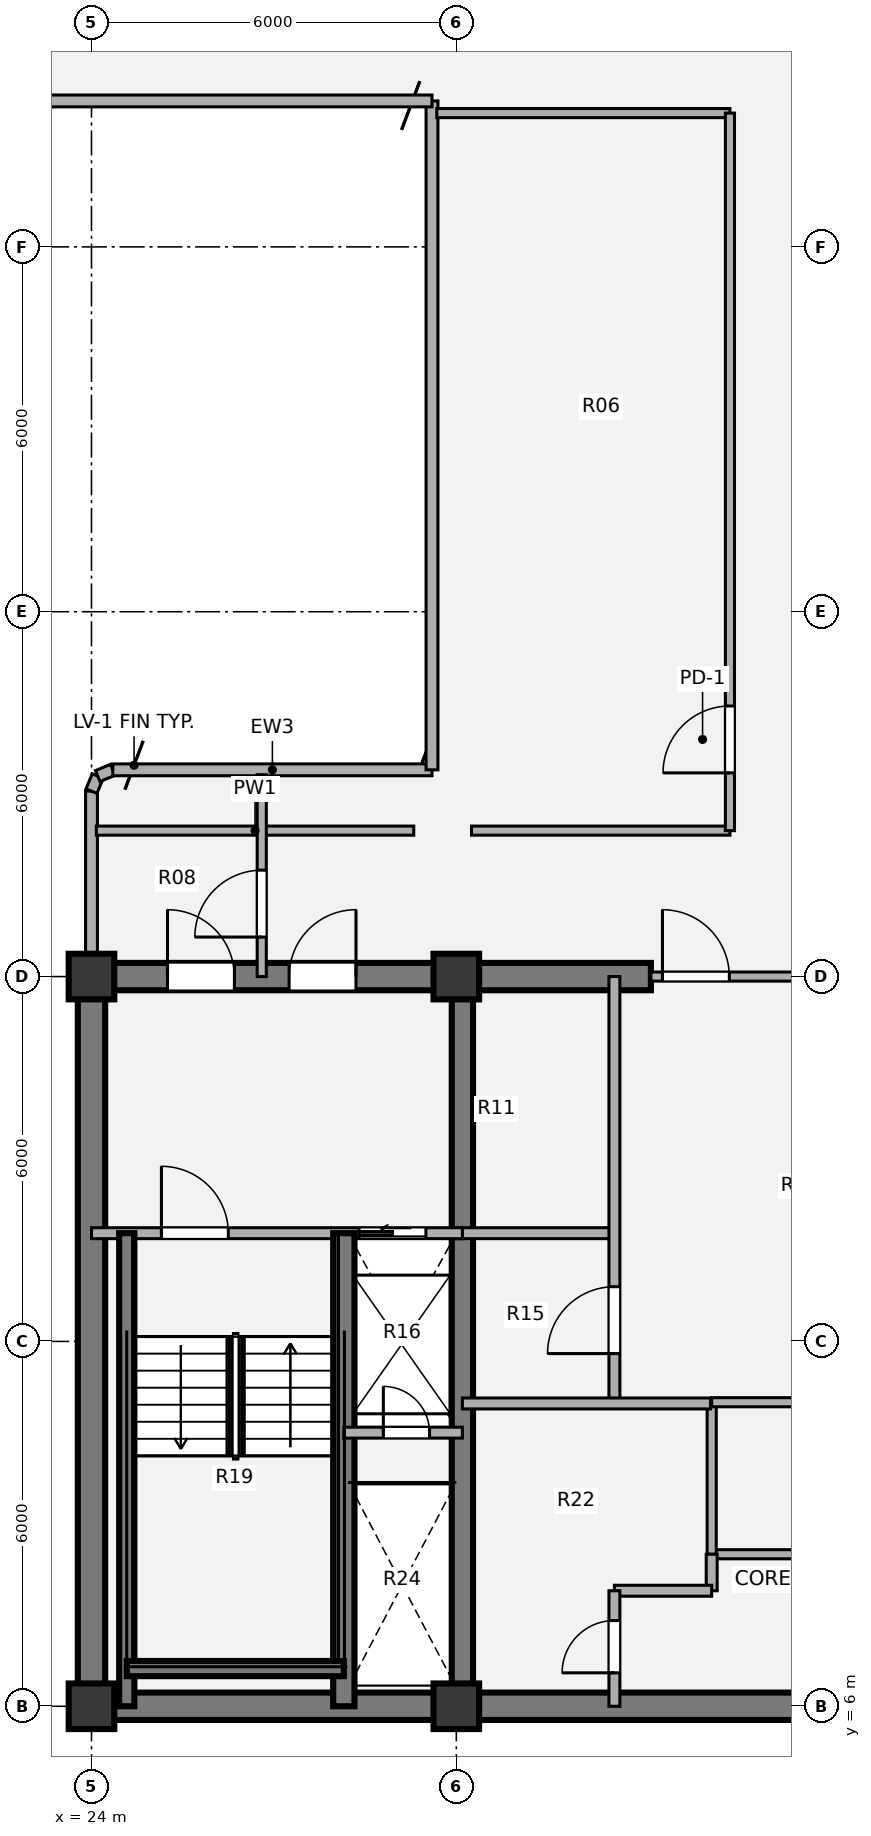
"""IFC4 building model, lengths in metres.
Left out: names, types, materials, properties, quantities, classifications, styles, units other than length and angle.
Written with IfcOpenShell. Run it as: python <this file> out.ifc"""

import sys

from ifc_helpers import new_model, si_unit, direction, frame, frame_2d, origin, origin_2d, place, context, subcontext, project, spatial, rectangle, extrude, source, transform, mapped, element, fill, save


model = new_model("IFC4")
c1 = context("Model", 3, precision=1e-05, world=origin(), true_north=direction((0.0, 1.0)))
c2 = subcontext(c1, "Body", "Model", "MODEL_VIEW")
j1 = project(units=[si_unit("LENGTHUNIT", "METRE"), si_unit("PLANEANGLEUNIT", "RADIAN")], contexts=[c1])
p1 = place(None, origin())
s1 = spatial("IfcSite", under=j1, at=p1, CompositionType="ELEMENT")
p2 = place(p1, origin())
s2 = spatial("IfcBuilding", under=s1, at=p2, CompositionType="ELEMENT")
p3 = place(p2, frame((0.0, 0.0, 213.12)))
s3 = spatial("IfcBuildingStorey", under=s2, at=p3, CompositionType="ELEMENT", Elevation=213.12)
m1 = source(origin(), c2, "Body", "SweptSolid", [
    extrude(rectangle(XDim=0.75, YDim=0.75, at=origin_2d()), origin(), (0.0, 0.0, 1.0), 5.4),
])
for number, where, z_axis, x_axis in (
    (1, (24.0, 6.0, 0.0), (0.0, 0.0, 1.0), (1.0, 0.0, 0.0)),
    (2, (30.0, 6.0, 0.0), (0.0, 0.0, 1.0), (1.0, 0.0, 0.0)),
    (3, (24.0, 18.0, 0.0), (0.0, 0.0, 1.0), (1.0, 0.0, 0.0)),
    (4, (30.0, 18.0, 0.0), (0.0, 0.0, 1.0), (1.0, 0.0, 0.0)),
):
    element("IfcColumn", number, at=place(p3, frame(where, z_axis=z_axis, x_axis=x_axis)), inside=s3, PredefinedType="COLUMN", context=c2, shape_type="MappedRepresentation", body=[
        mapped(m1, transform((0.0, 0.0, 0.0), x_axis=(1.0, 0.0, 0.0), y_axis=(0.0, 1.0, 0.0), z_axis=(0.0, 0.0, 1.0), scale=1.0)),
    ])
p4 = place(p3, frame((48.225, 6.0, 0.0), z_axis=(0.0, 0.0, 1.0), x_axis=(-1.0, 0.0, 0.0)))
e5 = element("IfcWall", 5, at=p4, inside=s3, PredefinedType="SHEAR", context=c2, shape_type="SweptSolid", body=[
    extrude(rectangle(XDim=24.45, YDim=0.45, at=frame_2d((12.225, 0.0))), origin(), (0.0, 0.0, 1.0), 5.4),
])
p5 = place(p3, frame((24.0, 6.0, 0.0), z_axis=(0.0, 0.0, 1.0), x_axis=(0.0, 1.0, 0.0)))
e6 = element("IfcWall", 6, at=p5, inside=s3, PredefinedType="SHEAR", context=c2, shape_type="SweptSolid", body=[
    extrude(rectangle(XDim=12.0, YDim=0.45, at=frame_2d((6.0, 0.0))), origin(), (0.0, 0.0, 1.0), 5.4),
])
p6 = place(p3, frame((23.775, 18.0, 0.0), z_axis=(0.0, 0.0, 1.0), x_axis=(1.0, 0.0, 0.0)))
e7 = element("IfcWall", 7, at=p6, inside=s3, PredefinedType="SHEAR", context=c2, shape_type="SweptSolid", body=[
    extrude(rectangle(XDim=9.425, YDim=0.45, at=frame_2d((4.712, 0.0))), origin(), (0.0, 0.0, 1.0), 5.4),
])
p7 = place(p6, frame((1.475, 0.0, 0.0)))
e8 = element("IfcOpeningElement", 8, at=p7, cuts=e7, PredefinedType="OPENING", context=c2, shape_type="SweptSolid", body=[
    extrude(rectangle(XDim=1.1, YDim=2.1, at=origin_2d()), frame((0.55, 0.235, 1.05), z_axis=(0.0, -1.0, 0.0), x_axis=(1.0, 0.0, 0.0)), (0.0, 0.0, 1.0), 0.47),
])
p8 = place(p6, frame((3.475, 0.0, 0.0)))
e9 = element("IfcOpeningElement", 9, at=p8, cuts=e7, PredefinedType="OPENING", context=c2, shape_type="SweptSolid", body=[
    extrude(rectangle(XDim=1.1, YDim=2.1, at=origin_2d()), frame((0.55, 0.235, 1.05), z_axis=(0.0, -1.0, 0.0), x_axis=(1.0, 0.0, 0.0)), (0.0, 0.0, 1.0), 0.47),
])
p9 = place(p3, frame((30.1, 6.0, 0.0), z_axis=(0.0, 0.0, 1.0), x_axis=(0.0, 1.0, 0.0)))
e10 = element("IfcWall", 10, at=p9, inside=s3, PredefinedType="SHEAR", context=c2, shape_type="SweptSolid", body=[
    extrude(rectangle(XDim=12.0, YDim=0.35, at=frame_2d((6.0, 0.0))), origin(), (0.0, 0.0, 1.0), 5.4),
])
p10 = place(p3, frame((24.0, 18.355, 0.0), z_axis=(0.0, 0.0, 1.0), x_axis=(0.0, 1.0, 0.0)))
e11 = element("IfcWall", 11, at=p10, inside=s3, PredefinedType="SOLIDWALL", context=c2, shape_type="SweptSolid", body=[
    extrude(rectangle(XDim=2.695, YDim=0.195, at=frame_2d((1.348, 0.0))), origin(), (0.0, 0.0, 1.0), 3.268),
])
p11 = place(p3, frame((24.0, 21.05, 0.0), z_axis=(0.0, 0.0, 1.0), x_axis=(0.382673670509, 0.923883575944, 0.0)))
e12 = element("IfcWall", 12, at=p11, inside=s3, PredefinedType="SOLIDWALL", context=c2, shape_type="SweptSolid", body=[
    extrude(rectangle(XDim=0.268, YDim=0.195, at=frame_2d((0.134, 0.0))), origin(), (0.0, 0.0, 1.0), 5.08),
])
p12 = place(p3, frame((24.103, 21.298, 0.0), z_axis=(0.0, 0.0, 1.0), x_axis=(0.924205486139, 0.381895560841, 0.0)))
e13 = element("IfcWall", 13, at=p12, inside=s3, PredefinedType="SOLIDWALL", context=c2, shape_type="SweptSolid", body=[
    extrude(rectangle(XDim=0.268, YDim=0.195, at=frame_2d((0.134, 0.0))), origin(), (0.0, 0.0, 1.0), 5.08),
])
p13 = place(p3, frame((24.35, 21.4, 0.0), z_axis=(0.0, 0.0, 1.0), x_axis=(1.0, 0.0, 0.0)))
e14 = element("IfcWall", 14, at=p13, inside=s3, PredefinedType="SOLIDWALL", context=c2, shape_type="SweptSolid", body=[
    extrude(rectangle(XDim=5.25, YDim=0.195, at=frame_2d((2.625, 0.0))), origin(), (0.0, 0.0, 1.0), 5.08),
])
p14 = place(p3, frame((29.6, 21.4, 0.0), z_axis=(0.0, 0.0, 1.0), x_axis=(0.0, 1.0, 0.0)))
e15 = element("IfcWall", 15, at=p14, inside=s3, PredefinedType="SOLIDWALL", context=c2, shape_type="SweptSolid", body=[
    extrude(rectangle(XDim=11.0, YDim=0.195, at=frame_2d((5.5, 0.0))), origin(), (0.0, 0.0, 1.0), 5.08),
])
p15 = place(p3, frame((29.6, 32.4, 0.0), z_axis=(0.0, 0.0, 1.0), x_axis=(-1.0, 0.0, 0.0)))
e16 = element("IfcWall", 16, at=p15, inside=s3, PredefinedType="SOLIDWALL", context=c2, shape_type="SweptSolid", body=[
    extrude(rectangle(XDim=10.6, YDim=0.195, at=frame_2d((5.3, 0.0))), origin(), (0.0, 0.0, 1.0), 5.08),
])
p16 = place(p3, frame((30.0, 13.78, 0.0), z_axis=(0.0, 0.0, 1.0), x_axis=(1.0, 0.0, 0.0)))
e17 = element("IfcWall", 17, at=p16, inside=s3, PredefinedType="PARTITIONING", context=c2, shape_type="SweptSolid", body=[
    extrude(rectangle(XDim=2.6, YDim=0.18, at=frame_2d((1.3, 0.0))), origin(), (0.0, 0.0, 1.0), 5.05),
])
p17 = place(p3, frame((32.6, 11.0, 0.0), z_axis=(0.0, 0.0, 1.0), x_axis=(0.0, 1.0, 0.0)))
e18 = element("IfcWall", 18, at=p17, inside=s3, PredefinedType="PARTITIONING", context=c2, shape_type="SweptSolid", body=[
    extrude(rectangle(XDim=7.0, YDim=0.18, at=frame_2d((3.5, 0.0))), origin(), (0.0, 0.0, 1.0), 5.05),
])
p18 = place(p17, frame((0.8, 0.0, 0.0)))
e19 = element("IfcOpeningElement", 19, at=p18, cuts=e18, PredefinedType="OPENING", context=c2, shape_type="SweptSolid", body=[
    extrude(rectangle(XDim=1.1, YDim=2.1, at=origin_2d()), frame((0.55, 0.1, 1.05), z_axis=(0.0, -1.0, 0.0), x_axis=(1.0, 0.0, 0.0)), (0.0, 0.0, 1.0), 0.2),
])
p19 = place(p3, frame((34.2, 8.5, 0.0), z_axis=(0.0, 0.0, 1.0), x_axis=(1.0, 0.0, 0.0)))
e20 = element("IfcWall", 20, at=p19, inside=s3, PredefinedType="PARTITIONING", context=c2, shape_type="SweptSolid", body=[
    extrude(rectangle(XDim=5.15, YDim=0.15, at=frame_2d((2.575, 0.0))), origin(), (0.0, 0.0, 1.0), 5.05),
])
p20 = place(p3, frame((34.2, 8.5, 0.0), z_axis=(0.0, 0.0, 1.0), x_axis=(0.0, 1.0, 0.0)))
e21 = element("IfcWall", 21, at=p20, inside=s3, PredefinedType="PARTITIONING", context=c2, shape_type="SweptSolid", body=[
    extrude(rectangle(XDim=2.5, YDim=0.15, at=frame_2d((1.25, 0.0))), origin(), (0.0, 0.0, 1.0), 5.05),
])
p21 = place(p3, frame((34.2, 11.0, 0.0), z_axis=(0.0, 0.0, 1.0), x_axis=(1.0, 0.0, 0.0)))
e22 = element("IfcWall", 22, at=p21, inside=s3, PredefinedType="PARTITIONING", context=c2, shape_type="SweptSolid", body=[
    extrude(rectangle(XDim=5.15, YDim=0.15, at=frame_2d((2.575, 0.0))), origin(), (0.0, 0.0, 1.0), 5.05),
])
p22 = place(p21, frame((2.0, 0.0, 0.0)))
e23 = element("IfcOpeningElement", 23, at=p22, cuts=e22, PredefinedType="OPENING", context=c2, shape_type="SweptSolid", body=[
    extrude(rectangle(XDim=1.1, YDim=2.1, at=origin_2d()), frame((0.55, 0.085, 1.05), z_axis=(0.0, -1.0, 0.0), x_axis=(1.0, 0.0, 0.0)), (0.0, 0.0, 1.0), 0.17),
])
p23 = place(p3, frame((30.1, 10.98, 0.0), z_axis=(0.0, 0.0, 1.0), x_axis=(1.0, 0.0, 0.0)))
e24 = element("IfcWall", 24, at=p23, inside=s3, PredefinedType="PARTITIONING", context=c2, shape_type="SweptSolid", body=[
    extrude(rectangle(XDim=4.08, YDim=0.18, at=frame_2d((2.04, 0.0))), origin(), (0.0, 0.0, 1.0), 5.05),
])
p24 = place(p3, frame((34.2, 7.9, 0.0), z_axis=(0.0, 0.0, 1.0), x_axis=(0.0, 1.0, 0.0)))
e25 = element("IfcWall", 25, at=p24, inside=s3, PredefinedType="PARTITIONING", context=c2, shape_type="SweptSolid", body=[
    extrude(rectangle(XDim=0.6, YDim=0.18, at=frame_2d((0.3, 0.0))), origin(), (0.0, 0.0, 1.0), 5.05),
])
p25 = place(p3, frame((32.6, 7.9, 0.0), z_axis=(0.0, 0.0, 1.0), x_axis=(1.0, 0.0, 0.0)))
e26 = element("IfcWall", 26, at=p25, inside=s3, PredefinedType="PARTITIONING", context=c2, shape_type="SweptSolid", body=[
    extrude(rectangle(XDim=1.6, YDim=0.18, at=frame_2d((0.8, 0.0))), origin(), (0.0, 0.0, 1.0), 5.05),
])
p26 = place(p3, frame((32.6, 6.0, 0.0), z_axis=(0.0, 0.0, 1.0), x_axis=(0.0, 1.0, 0.0)))
e27 = element("IfcWall", 27, at=p26, inside=s3, PredefinedType="PARTITIONING", context=c2, shape_type="SweptSolid", body=[
    extrude(rectangle(XDim=1.9, YDim=0.18, at=frame_2d((0.95, 0.0))), origin(), (0.0, 0.0, 1.0), 5.05),
])
p27 = place(p26, frame((0.55, 0.0, 0.0)))
e28 = element("IfcOpeningElement", 28, at=p27, cuts=e27, PredefinedType="OPENING", context=c2, shape_type="SweptSolid", body=[
    extrude(rectangle(XDim=0.86, YDim=2.1, at=origin_2d()), frame((0.43, 0.1, 1.05), z_axis=(0.0, -1.0, 0.0), x_axis=(1.0, 0.0, 0.0)), (0.0, 0.0, 1.0), 0.2),
])
p28 = place(p3, frame((33.2, 18.0, 0.0), z_axis=(0.0, 0.0, 1.0), x_axis=(1.0, 0.0, 0.0)))
e29 = element("IfcWall", 29, at=p28, inside=s3, PredefinedType="PARTITIONING", context=c2, shape_type="SweptSolid", body=[
    extrude(rectangle(XDim=5.6, YDim=0.15, at=frame_2d((2.8, 0.0))), origin(), (0.0, 0.0, 1.0), 4.065),
])
p29 = place(p28, frame((0.19, 0.0, 0.0)))
e30 = element("IfcOpeningElement", 30, at=p29, cuts=e29, PredefinedType="OPENING", context=c2, shape_type="SweptSolid", body=[
    extrude(rectangle(XDim=1.1, YDim=2.1, at=origin_2d()), frame((0.55, 0.085, 1.05), z_axis=(0.0, -1.0, 0.0), x_axis=(1.0, 0.0, 0.0)), (0.0, 0.0, 1.0), 0.17),
])
p30 = place(p28, frame((4.31, 0.0, 0.0)))
e31 = element("IfcOpeningElement", 31, at=p30, cuts=e29, PredefinedType="OPENING", context=c2, shape_type="SweptSolid", body=[
    extrude(rectangle(XDim=1.1, YDim=2.1, at=origin_2d()), frame((0.55, 0.085, 1.05), z_axis=(0.0, -1.0, 0.0), x_axis=(1.0, 0.0, 0.0)), (0.0, 0.0, 1.0), 0.17),
])
p31 = place(p3, frame((24.0, 13.78, 0.0), z_axis=(0.0, 0.0, 1.0), x_axis=(1.0, 0.0, 0.0)))
e32 = element("IfcWall", 32, at=p31, inside=s3, PredefinedType="PARTITIONING", context=c2, shape_type="SweptSolid", body=[
    extrude(rectangle(XDim=6.1, YDim=0.18, at=frame_2d((3.05, 0.0))), origin(), (0.0, 0.0, 1.0), 2.229),
])
p32 = place(p31, frame((1.15, 0.0, 0.0)))
e33 = element("IfcOpeningElement", 33, at=p32, cuts=e32, PredefinedType="OPENING", context=c2, shape_type="SweptSolid", body=[
    extrude(rectangle(XDim=1.1, YDim=2.1, at=origin_2d()), frame((0.55, 0.1, 1.05), z_axis=(0.0, -1.0, 0.0), x_axis=(1.0, 0.0, 0.0)), (0.0, 0.0, 1.0), 0.2),
])
p33 = place(p31, frame((4.4, 0.0, 0.0)))
e34 = element("IfcOpeningElement", 34, at=p33, cuts=e32, PredefinedType="OPENING", context=c2, shape_type="SweptSolid", body=[
    extrude(rectangle(XDim=1.1, YDim=2.1, at=origin_2d()), frame((0.55, 0.1, 1.05), z_axis=(0.0, -1.0, 0.0), x_axis=(1.0, 0.0, 0.0)), (0.0, 0.0, 1.0), 0.2),
])
p34 = place(p3, frame((28.15, 6.0, 0.0), z_axis=(0.0, 0.0, 1.0), x_axis=(0.0, 1.0, 0.0)))
e35 = element("IfcWall", 35, at=p34, inside=s3, PredefinedType="SHEAR", context=c2, shape_type="SweptSolid", body=[
    extrude(rectangle(XDim=7.78, YDim=0.35, at=frame_2d((3.89, 0.0))), origin(), (0.0, 0.0, 1.0), 5.4),
])
p35 = place(p3, frame((24.58, 6.0, 0.0), z_axis=(0.0, 0.0, 1.0), x_axis=(0.0, 1.0, 0.0)))
e36 = element("IfcWall", 36, at=p35, inside=s3, PredefinedType="SHEAR", context=c2, shape_type="SweptSolid", body=[
    extrude(rectangle(XDim=7.78, YDim=0.25, at=frame_2d((3.89, 0.0))), origin(), (0.0, 0.0, 1.0), 5.4),
])
p36 = place(p3, frame((24.58, 6.62, 0.0), z_axis=(0.0, 0.0, 1.0), x_axis=(1.0, 0.0, 0.0)))
e37 = element("IfcWall", 37, at=p36, inside=s3, PredefinedType="SHEAR", context=c2, shape_type="SweptSolid", body=[
    extrude(rectangle(XDim=3.57, YDim=0.25, at=frame_2d((1.785, 0.0))), origin(), (0.0, 0.0, 1.0), 5.4),
])
p37 = place(p3, frame((28.15, 10.5, 0.0), z_axis=(0.0, 0.0, 1.0), x_axis=(1.0, 0.0, 0.0)))
e38 = element("IfcWall", 38, at=p37, inside=s3, PredefinedType="PARTITIONING", context=c2, shape_type="SweptSolid", body=[
    extrude(rectangle(XDim=1.95, YDim=0.18, at=frame_2d((0.975, 0.0))), origin(), (0.0, 0.0, 1.0), 5.05),
])
p38 = place(p37, frame((0.65, 0.0, 0.0)))
e39 = element("IfcOpeningElement", 39, at=p38, cuts=e38, PredefinedType="OPENING", context=c2, shape_type="SweptSolid", body=[
    extrude(rectangle(XDim=0.76, YDim=2.05, at=origin_2d()), frame((0.38, 0.1, 1.025), z_axis=(0.0, -1.0, 0.0), x_axis=(1.0, 0.0, 0.0)), (0.0, 0.0, 1.0), 0.2),
])
p39 = place(p3, frame((24.08, 20.4, 0.0), z_axis=(0.0, 0.0, 1.0), x_axis=(1.0, 0.0, 0.0)))
e40 = element("IfcWall", 40, at=p39, inside=s3, PredefinedType="PARTITIONING", context=c2, shape_type="SweptSolid", body=[
    extrude(rectangle(XDim=5.22, YDim=0.15, at=frame_2d((2.61, 0.0))), origin(), (0.0, 0.0, 1.0), 5.05),
])
p40 = place(p3, frame((30.25, 20.4, 0.0), z_axis=(0.0, 0.0, 1.0), x_axis=(1.0, 0.0, 0.0)))
e41 = element("IfcWall", 41, at=p40, inside=s3, PredefinedType="PARTITIONING", context=c2, shape_type="SweptSolid", body=[
    extrude(rectangle(XDim=4.25, YDim=0.15, at=frame_2d((2.125, 0.0))), origin(), (0.0, 0.0, 1.0), 5.05),
])
p41 = place(p3, frame((29.678, 32.2, 0.0), z_axis=(0.0, 0.0, 1.0), x_axis=(1.0, 0.0, 0.0)))
e42 = element("IfcWall", 42, at=p41, inside=s3, PredefinedType="PARTITIONING", context=c2, shape_type="SweptSolid", body=[
    extrude(rectangle(XDim=4.822, YDim=0.15, at=frame_2d((2.411, 0.0))), origin(), (0.0, 0.0, 1.0), 5.05),
])
p42 = place(p3, frame((26.8, 18.0, 0.0), z_axis=(0.0, 0.0, 1.0), x_axis=(0.0, 1.0, 0.0)))
e43 = element("IfcWall", 43, at=p42, inside=s3, PredefinedType="PARTITIONING", context=c2, shape_type="SweptSolid", body=[
    extrude(rectangle(XDim=3.32, YDim=0.15, at=frame_2d((1.66, 0.0))), origin(), (0.0, 0.0, 1.0), 5.05),
])
p43 = place(p42, frame((0.65, 0.0, 0.0)))
e44 = element("IfcOpeningElement", 44, at=p43, cuts=e43, PredefinedType="OPENING", context=c2, shape_type="SweptSolid", body=[
    extrude(rectangle(XDim=1.1, YDim=2.1, at=origin_2d()), frame((0.55, 0.085, 1.05), z_axis=(0.0, -1.0, 0.0), x_axis=(1.0, 0.0, 0.0)), (0.0, 0.0, 1.0), 0.17),
])
p44 = place(p3, frame((34.5, 20.4, 0.0), z_axis=(0.0, 0.0, 1.0), x_axis=(0.0, 1.0, 0.0)))
e45 = element("IfcWall", 45, at=p44, inside=s3, PredefinedType="PARTITIONING", context=c2, shape_type="SweptSolid", body=[
    extrude(rectangle(XDim=11.8, YDim=0.15, at=frame_2d((5.9, 0.0))), origin(), (0.0, 0.0, 1.0), 5.05),
])
p45 = place(p44, frame((0.95, 0.0, 0.0)))
e46 = element("IfcOpeningElement", 46, at=p45, cuts=e45, PredefinedType="OPENING", context=c2, shape_type="SweptSolid", body=[
    extrude(rectangle(XDim=1.1, YDim=2.1, at=origin_2d()), frame((0.55, 0.085, 1.05), z_axis=(0.0, -1.0, 0.0), x_axis=(1.0, 0.0, 0.0)), (0.0, 0.0, 1.0), 0.17),
])
m2 = source(origin(), c2, "Body", "SweptSolid", [
    extrude(rectangle(XDim=1.1, YDim=2.1, at=origin_2d()), frame((0.55, 0.025, 1.05), z_axis=(0.0, -1.0, 0.0), x_axis=(1.0, 0.0, 0.0)), (0.0, 0.0, 1.0), 0.05),
])
p46 = place(p18, origin())
e47 = element("IfcDoor", 47, at=p46, inside=s3, OperationType="SINGLE_SWING_LEFT", PredefinedType="DOOR", context=c2, shape_type="MappedRepresentation", body=[
    mapped(m2, transform((0.0, 0.0, 0.0), x_axis=(1.0, 0.0, 0.0), y_axis=(0.0, 1.0, 0.0), z_axis=(0.0, 0.0, 1.0), scale=1.0)),
])
fill(e19, e47)
m3 = source(origin(), c2, "Body", "SweptSolid", [
    extrude(rectangle(XDim=0.86, YDim=2.1, at=origin_2d()), frame((0.43, 0.025, 1.05), z_axis=(0.0, -1.0, 0.0), x_axis=(1.0, 0.0, 0.0)), (0.0, 0.0, 1.0), 0.05),
])
p47 = place(p27, origin())
e48 = element("IfcDoor", 48, at=p47, inside=s3, OperationType="SINGLE_SWING_LEFT", PredefinedType="DOOR", context=c2, shape_type="MappedRepresentation", body=[
    mapped(m3, transform((0.0, 0.0, 0.0), x_axis=(1.0, 0.0, 0.0), y_axis=(0.0, 1.0, 0.0), z_axis=(0.0, 0.0, 1.0), scale=1.0)),
])
fill(e28, e48)
m4 = source(origin(), c2, "Body", "SweptSolid", [
    extrude(rectangle(XDim=1.1, YDim=2.1, at=origin_2d()), frame((0.55, 0.025, 1.05), z_axis=(0.0, -1.0, 0.0), x_axis=(1.0, 0.0, 0.0)), (0.0, 0.0, 1.0), 0.05),
])
p48 = place(p29, origin())
e49 = element("IfcDoor", 49, at=p48, inside=s3, OperationType="SINGLE_SWING_LEFT", PredefinedType="DOOR", context=c2, shape_type="MappedRepresentation", body=[
    mapped(m4, transform((0.0, 0.0, 0.0), x_axis=(1.0, 0.0, 0.0), y_axis=(0.0, 1.0, 0.0), z_axis=(0.0, 0.0, 1.0), scale=1.0)),
])
fill(e30, e49)
m5 = source(origin(), c2, "Body", "SweptSolid", [
    extrude(rectangle(XDim=1.1, YDim=2.1, at=origin_2d()), frame((0.55, 0.025, 1.05), z_axis=(0.0, -1.0, 0.0), x_axis=(1.0, 0.0, 0.0)), (0.0, 0.0, 1.0), 0.05),
])
p49 = place(p32, origin())
e50 = element("IfcDoor", 50, at=p49, inside=s3, OperationType="SINGLE_SWING_LEFT", PredefinedType="DOOR", context=c2, shape_type="MappedRepresentation", body=[
    mapped(m5, transform((0.0, 0.0, 0.0), x_axis=(1.0, 0.0, 0.0), y_axis=(0.0, 1.0, 0.0), z_axis=(0.0, 0.0, 1.0), scale=1.0)),
])
fill(e33, e50)
m6 = source(origin(), c2, "Body", "SweptSolid", [
    extrude(rectangle(XDim=1.1, YDim=2.1, at=origin_2d()), frame((0.55, 0.025, 1.05), z_axis=(0.0, -1.0, 0.0), x_axis=(1.0, 0.0, 0.0)), (0.0, 0.0, 1.0), 0.05),
])
p50 = place(p33, origin())
e51 = element("IfcDoor", 51, at=p50, inside=s3, OperationType="SLIDING_TO_LEFT", PredefinedType="DOOR", context=c2, shape_type="MappedRepresentation", body=[
    mapped(m6, transform((0.0, 0.0, 0.0), x_axis=(1.0, 0.0, 0.0), y_axis=(0.0, 1.0, 0.0), z_axis=(0.0, 0.0, 1.0), scale=1.0)),
])
fill(e34, e51)
m7 = source(origin(), c2, "Body", "SweptSolid", [
    extrude(rectangle(XDim=0.76, YDim=2.05, at=origin_2d()), frame((0.38, 0.025, 1.025), z_axis=(0.0, -1.0, 0.0), x_axis=(1.0, 0.0, 0.0)), (0.0, 0.0, 1.0), 0.05),
])
p51 = place(p38, origin())
e52 = element("IfcDoor", 52, at=p51, inside=s3, OperationType="SINGLE_SWING_LEFT", PredefinedType="DOOR", context=c2, shape_type="MappedRepresentation", body=[
    mapped(m7, transform((0.0, 0.0, 0.0), x_axis=(1.0, 0.0, 0.0), y_axis=(0.0, 1.0, 0.0), z_axis=(0.0, 0.0, 1.0), scale=1.0)),
])
fill(e39, e52)
p52 = place(p7, origin())
e53 = element("IfcDoor", 53, at=p52, inside=s3, OperationType="SINGLE_SWING_LEFT", PredefinedType="DOOR", context=c2, shape_type="MappedRepresentation", body=[
    mapped(m4, transform((0.0, 0.0, 0.0), x_axis=(1.0, 0.0, 0.0), y_axis=(0.0, 1.0, 0.0), z_axis=(0.0, 0.0, 1.0), scale=1.0)),
])
fill(e8, e53)
p53 = place(p8, origin())
e54 = element("IfcDoor", 54, at=p53, inside=s3, OperationType="SINGLE_SWING_RIGHT", PredefinedType="DOOR", context=c2, shape_type="MappedRepresentation", body=[
    mapped(m4, transform((0.0, 0.0, 0.0), x_axis=(1.0, 0.0, 0.0), y_axis=(0.0, 1.0, 0.0), z_axis=(0.0, 0.0, 1.0), scale=1.0)),
])
fill(e9, e54)
p54 = place(p43, origin())
e55 = element("IfcDoor", 55, at=p54, inside=s3, OperationType="SINGLE_SWING_LEFT", PredefinedType="DOOR", context=c2, shape_type="MappedRepresentation", body=[
    mapped(m2, transform((0.0, 0.0, 0.0), x_axis=(1.0, 0.0, 0.0), y_axis=(0.0, 1.0, 0.0), z_axis=(0.0, 0.0, 1.0), scale=1.0)),
])
fill(e44, e55)
p55 = place(p45, origin())
e56 = element("IfcDoor", 56, at=p55, inside=s3, OperationType="SINGLE_SWING_LEFT", PredefinedType="DOOR", context=c2, shape_type="MappedRepresentation", body=[
    mapped(m2, transform((0.0, 0.0, 0.0), x_axis=(1.0, 0.0, 0.0), y_axis=(0.0, 1.0, 0.0), z_axis=(0.0, 0.0, 1.0), scale=1.0)),
])
fill(e46, e56)
save(model, sys.argv[1])
